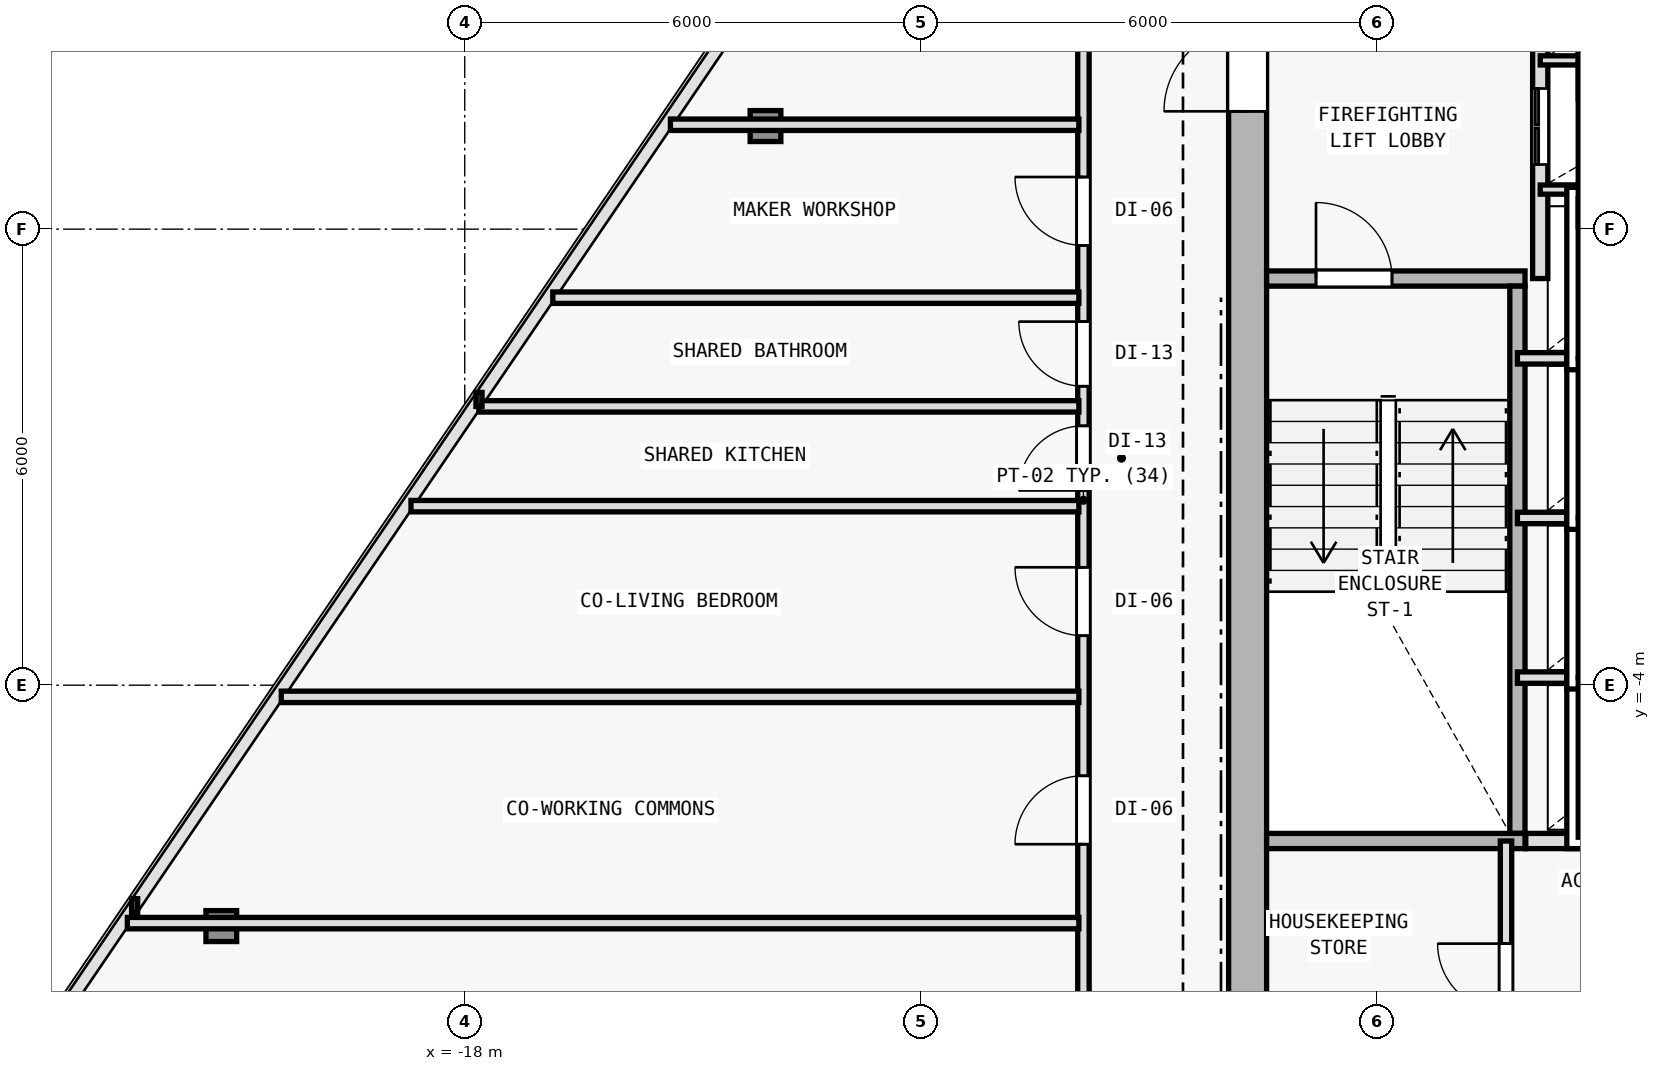
"""IFC4 building model, lengths in metres.
Left out: names, types, materials, properties, quantities, classifications, styles, units other than length and angle.
Written with IfcOpenShell. Run it as: python <this file> out.ifc"""

import sys

from ifc_helpers import new_model, si_unit, direction, frame, frame_2d, origin, origin_2d, place, context, subcontext, project, spatial, rectangle, i_section, extrude, element, fill, save


model = new_model("IFC4")
c1 = context("Model", 3, precision=1e-05, world=origin(), true_north=direction((0.0, 1.0)))
c2 = subcontext(c1, "Body", "Model", "MODEL_VIEW")
j1 = project(units=[si_unit("LENGTHUNIT", "METRE"), si_unit("PLANEANGLEUNIT", "RADIAN")], contexts=[c1])
p1 = place(None, origin())
s1 = spatial("IfcSite", under=j1, at=p1, CompositionType="ELEMENT")
p2 = place(p1, origin())
s2 = spatial("IfcBuilding", under=s1, at=p2, CompositionType="ELEMENT")
p3 = place(p2, frame((0.0, 0.0, 156.6)))
s3 = spatial("IfcBuildingStorey", under=s2, at=p3, CompositionType="ELEMENT", Elevation=156.6)
p4 = place(p3, frame((-7.7, 2.0, 0.0), z_axis=(0.0, 0.0, 1.0), x_axis=(1.0, 0.0, 0.0)))
e1 = element("IfcColumn", 1, at=p4, inside=s3, PredefinedType="COLUMN", context=c2, shape_type="SweptSolid", body=[
    extrude(i_section(OverallWidth=0.404, OverallDepth=0.407, WebThickness=0.017, FlangeThickness=0.028, FilletRadius=0.015, at=origin_2d()), origin(), (0.0, 0.0, 1.0), 3.6),
])
p5 = place(p3, frame((-14.043, 3.356, 0.005), z_axis=(0.01700241672, 0.009521353363, 0.999810112799), x_axis=(-0.488603368932, 0.87250601595, 0.0)))
e2 = element("IfcColumn", 2, at=p5, inside=s3, PredefinedType="COLUMN", context=c2, shape_type="SweptSolid", body=[
    extrude(i_section(OverallWidth=0.404, OverallDepth=0.407, WebThickness=0.017, FlangeThickness=0.028, FilletRadius=0.015, at=origin_2d()), origin(), (0.0, 0.0, 1.0), 3.59),
])
p6 = place(p3, frame((-21.203, -7.169, 0.005), z_axis=(0.025222449659, 0.021619242565, 0.999448065876), x_axis=(-0.650791373456, 0.759256602365, 0.0)))
e3 = element("IfcColumn", 3, at=p6, inside=s3, PredefinedType="COLUMN", context=c2, shape_type="SweptSolid", body=[
    extrude(i_section(OverallWidth=0.404, OverallDepth=0.407, WebThickness=0.017, FlangeThickness=0.028, FilletRadius=0.015, at=origin_2d()), origin(), (0.0, 0.0, 1.0), 3.591),
])
p7 = place(p3, frame((-7.7, -9.15, 0.0), z_axis=(0.0, 0.0, 1.0), x_axis=(0.0, 1.0, 0.0)))
e4 = element("IfcWall", 4, at=p7, inside=s3, PredefinedType="SHEAR", context=c2, shape_type="SweptSolid", body=[
    extrude(rectangle(XDim=19.1, YDim=0.5, at=frame_2d((9.55, 0.0))), origin(), (0.0, 0.0, 1.0), 3.35),
])
p8 = place(p7, frame((12.7, 0.0, 0.0)))
e5 = element("IfcOpeningElement", 5, at=p8, cuts=e4, PredefinedType="OPENING", context=c2, shape_type="SweptSolid", body=[
    extrude(rectangle(XDim=1.1, YDim=2.15, at=frame_2d((0.55, 1.075))), frame((0.0, 0.26, 0.0), z_axis=(0.0, -1.0, 0.0), x_axis=(1.0, 0.0, 0.0)), (0.0, 0.0, 1.0), 0.52),
])
p9 = place(p3, frame((-7.45, 1.35, 0.0), z_axis=(0.0, 0.0, 1.0), x_axis=(1.0, 0.0, 0.0)))
e6 = element("IfcWall", 6, at=p9, inside=s3, PredefinedType="SOLIDWALL", context=c2, shape_type="SweptSolid", body=[
    extrude(rectangle(XDim=3.4, YDim=0.2, at=frame_2d((1.7, 0.0))), origin(), (0.0, 0.0, 1.0), 3.35),
])
p10 = place(p9, frame((0.65, 0.0, 0.0)))
e7 = element("IfcOpeningElement", 7, at=p10, cuts=e6, PredefinedType="OPENING", context=c2, shape_type="SweptSolid", body=[
    extrude(rectangle(XDim=1.0, YDim=2.15, at=frame_2d((0.5, 1.075))), frame((0.0, 0.11, 0.0), z_axis=(0.0, -1.0, 0.0), x_axis=(1.0, 0.0, 0.0)), (0.0, 0.0, 1.0), 0.22),
])
p11 = place(p3, frame((-4.15, -5.95, 0.0), z_axis=(0.0, 0.0, 1.0), x_axis=(0.0, 1.0, 0.0)))
e8 = element("IfcWall", 8, at=p11, inside=s3, PredefinedType="SOLIDWALL", context=c2, shape_type="SweptSolid", body=[
    extrude(rectangle(XDim=7.2, YDim=0.2, at=frame_2d((3.6, 0.0))), origin(), (0.0, 0.0, 1.0), 3.35),
])
p12 = place(p3, frame((-3.85, 1.35, 0.0), z_axis=(0.0, 0.0, 1.0), x_axis=(0.0, 1.0, 0.0)))
e9 = element("IfcWall", 9, at=p12, inside=s3, PredefinedType="SOLIDWALL", context=c2, shape_type="SweptSolid", body=[
    extrude(rectangle(XDim=8.595, YDim=0.2, at=frame_2d((4.297, 0.0))), origin(), (0.0, 0.0, 1.0), 3.35),
])
p13 = place(p12, frame((1.5, 0.0, 0.0)))
e10 = element("IfcOpeningElement", 10, at=p13, cuts=e9, PredefinedType="OPENING", context=c2, shape_type="SweptSolid", body=[
    extrude(rectangle(XDim=1.0, YDim=2.15, at=frame_2d((0.5, 1.075))), frame((0.0, 0.11, 0.0), z_axis=(0.0, -1.0, 0.0), x_axis=(1.0, 0.0, 0.0)), (0.0, 0.0, 1.0), 0.22),
])
p14 = place(p12, frame((3.18, 0.0, 0.0)))
e11 = element("IfcOpeningElement", 11, at=p14, cuts=e9, PredefinedType="OPENING", context=c2, shape_type="SweptSolid", body=[
    extrude(rectangle(XDim=1.0, YDim=2.15, at=frame_2d((0.5, 1.075))), frame((0.0, 0.11, 0.0), z_axis=(0.0, -1.0, 0.0), x_axis=(1.0, 0.0, 0.0)), (0.0, 0.0, 1.0), 0.22),
])
for number, where, z_axis, x_axis in (
    (12, (-3.85, 2.52, 0.0), (0.0, 0.0, 1.0), (1.0, 0.0, 0.0)),
    (13, (-3.85, 4.22, 0.0), (0.0, 0.0, 1.0), (1.0, 0.0, 0.0)),
):
    element("IfcWall", number, at=place(p3, frame(where, z_axis=z_axis, x_axis=x_axis)), inside=s3, PredefinedType="PARTITIONING", context=c2, shape_type="SweptSolid", body=[
        extrude(rectangle(XDim=2.9, YDim=0.12, at=frame_2d((1.45, 0.0))), origin(), (0.0, 0.0, 1.0), 3.35),
    ])
for number, where, z_axis, x_axis in (
    (14, (-4.15, -3.9, 0.0), (0.0, 0.0, 1.0), (1.0, 0.0, 0.0)),
    (15, (-4.15, -1.8, 0.0), (0.0, 0.0, 1.0), (1.0, 0.0, 0.0)),
    (16, (-4.15, 0.3, 0.0), (0.0, 0.0, 1.0), (1.0, 0.0, 0.0)),
):
    element("IfcWall", number, at=place(p3, frame(where, z_axis=z_axis, x_axis=x_axis)), inside=s3, PredefinedType="PARTITIONING", context=c2, shape_type="SweptSolid", body=[
        extrude(rectangle(XDim=2.9, YDim=0.15, at=frame_2d((1.45, 0.0))), origin(), (0.0, 0.0, 1.0), 3.35),
    ])
p15 = place(p3, frame((-7.45, -6.05, 0.0), z_axis=(0.0, 0.0, 1.0), x_axis=(1.0, 0.0, 0.0)))
e17 = element("IfcWall", 17, at=p15, inside=s3, PredefinedType="SOLIDWALL", context=c2, shape_type="SweptSolid", body=[
    extrude(rectangle(XDim=3.4, YDim=0.2, at=frame_2d((1.7, 0.0))), origin(), (0.0, 0.0, 1.0), 3.35),
])
p16 = place(p3, frame((-4.04, -6.05, 0.0), z_axis=(0.0, 0.0, 1.0), x_axis=(1.0, 0.0, 0.0)))
e18 = element("IfcWall", 18, at=p16, inside=s3, PredefinedType="SOLIDWALL", context=c2, shape_type="SweptSolid", body=[
    extrude(rectangle(XDim=2.79, YDim=0.2, at=frame_2d((1.395, 0.0))), origin(), (0.0, 0.0, 1.0), 3.35),
])
p17 = place(p3, frame((-4.3, -9.145, 0.0), z_axis=(0.0, 0.0, 1.0), x_axis=(0.0, 1.0, 0.0)))
e19 = element("IfcWall", 19, at=p17, inside=s3, PredefinedType="PARTITIONING", context=c2, shape_type="SweptSolid", body=[
    extrude(rectangle(XDim=3.095, YDim=0.15, at=frame_2d((1.547, 0.0))), origin(), (0.0, 0.0, 1.0), 3.35),
])
p18 = place(p17, frame((0.845, 0.0, 0.0)))
e20 = element("IfcOpeningElement", 20, at=p18, cuts=e19, PredefinedType="OPENING", context=c2, shape_type="SweptSolid", body=[
    extrude(rectangle(XDim=0.9, YDim=2.1, at=frame_2d((0.45, 1.05))), frame((0.0, 0.085, 0.0), z_axis=(0.0, -1.0, 0.0), x_axis=(1.0, 0.0, 0.0)), (0.0, 0.0, 1.0), 0.17),
])
p19 = place(p3, frame((-9.86, -11.56, 0.0), z_axis=(0.0, 0.0, 1.0), x_axis=(0.0, 1.0, 0.0)))
e21 = element("IfcWall", 21, at=p19, inside=s3, PredefinedType="PARTITIONING", context=c2, shape_type="SweptSolid", body=[
    extrude(rectangle(XDim=19.986, YDim=0.15, at=frame_2d((9.993, 0.0))), origin(), (0.0, 0.0, 1.0), 2.775),
])
p20 = place(p19, frame((11.493, 0.0, 0.0)))
e22 = element("IfcOpeningElement", 22, at=p20, cuts=e21, PredefinedType="OPENING", context=c2, shape_type="SweptSolid", body=[
    extrude(rectangle(XDim=0.85, YDim=2.1, at=frame_2d((0.425, 1.05))), frame((0.0, 0.085, 0.0), z_axis=(0.0, -1.0, 0.0), x_axis=(1.0, 0.0, 0.0)), (0.0, 0.0, 1.0), 0.17),
])
p21 = place(p19, frame((10.122, 0.0, 0.0)))
e23 = element("IfcOpeningElement", 23, at=p21, cuts=e21, PredefinedType="OPENING", context=c2, shape_type="SweptSolid", body=[
    extrude(rectangle(XDim=0.85, YDim=2.1, at=frame_2d((0.425, 1.05))), frame((0.0, 0.085, 0.0), z_axis=(0.0, -1.0, 0.0), x_axis=(1.0, 0.0, 0.0)), (0.0, 0.0, 1.0), 0.17),
])
p22 = place(p19, frame((8.211, 0.0, 0.0)))
e24 = element("IfcOpeningElement", 24, at=p22, cuts=e21, PredefinedType="OPENING", context=c2, shape_type="SweptSolid", body=[
    extrude(rectangle(XDim=0.9, YDim=2.1, at=frame_2d((0.45, 1.05))), frame((0.0, 0.085, 0.0), z_axis=(0.0, -1.0, 0.0), x_axis=(1.0, 0.0, 0.0)), (0.0, 0.0, 1.0), 0.17),
])
p23 = place(p19, frame((5.468, 0.0, 0.0)))
e25 = element("IfcOpeningElement", 25, at=p23, cuts=e21, PredefinedType="OPENING", context=c2, shape_type="SweptSolid", body=[
    extrude(rectangle(XDim=0.9, YDim=2.1, at=frame_2d((0.45, 1.05))), frame((0.0, 0.085, 0.0), z_axis=(0.0, -1.0, 0.0), x_axis=(1.0, 0.0, 0.0)), (0.0, 0.0, 1.0), 0.17),
])
p24 = place(p19, frame((1.854, 0.0, 0.0)))
e26 = element("IfcOpeningElement", 26, at=p24, cuts=e21, PredefinedType="OPENING", context=c2, shape_type="SweptSolid", body=[
    extrude(rectangle(XDim=0.9, YDim=2.1, at=frame_2d((0.45, 1.05))), frame((0.0, 0.085, 0.0), z_axis=(0.0, -1.0, 0.0), x_axis=(1.0, 0.0, 0.0)), (0.0, 0.0, 1.0), 0.17),
])
p25 = place(p19, frame((13.346, 0.0, 0.0)))
e27 = element("IfcOpeningElement", 27, at=p25, cuts=e21, PredefinedType="OPENING", context=c2, shape_type="SweptSolid", body=[
    extrude(rectangle(XDim=0.9, YDim=2.1, at=frame_2d((0.45, 1.05))), frame((0.0, 0.085, 0.0), z_axis=(0.0, -1.0, 0.0), x_axis=(1.0, 0.0, 0.0)), (0.0, 0.0, 1.0), 0.17),
])
p26 = place(p3, frame((-9.92, 3.373, 0.0), z_axis=(0.0, 0.0, 1.0), x_axis=(-1.0, 0.0, 0.0)))
e28 = element("IfcWall", 28, at=p26, inside=s3, PredefinedType="PARTITIONING", context=c2, shape_type="SweptSolid", body=[
    extrude(rectangle(XDim=5.374, YDim=0.15, at=frame_2d((2.687, 0.0))), origin(), (0.0, 0.0, 1.0), 2.885),
])
p27 = place(p3, frame((-9.92, -7.13, 0.0), z_axis=(0.0, 0.0, 1.0), x_axis=(-1.0, 0.0, 0.0)))
e29 = element("IfcWall", 29, at=p27, inside=s3, PredefinedType="PARTITIONING", context=c2, shape_type="SweptSolid", body=[
    extrude(rectangle(XDim=12.519, YDim=0.15, at=frame_2d((6.26, 0.0))), origin(), (0.0, 0.0, 1.0), 2.775),
])
p28 = place(p3, frame((-9.92, -1.645, 0.0), z_axis=(0.0, 0.0, 1.0), x_axis=(-1.0, 0.0, 0.0)))
e30 = element("IfcWall", 30, at=p28, inside=s3, PredefinedType="PARTITIONING", context=c2, shape_type="SweptSolid", body=[
    extrude(rectangle(XDim=8.788, YDim=0.15, at=frame_2d((4.394, 0.0))), origin(), (0.0, 0.0, 1.0), 2.885),
])
p29 = place(p3, frame((-9.92, -4.154, 0.0), z_axis=(0.0, 0.0, 1.0), x_axis=(-0.999999999729, 2.3263929e-05, 0.0)))
e31 = element("IfcWall", 31, at=p29, inside=s3, PredefinedType="PARTITIONING", context=c2, shape_type="SweptSolid", body=[
    extrude(rectangle(XDim=10.494, YDim=0.15, at=frame_2d((5.247, 0.0))), origin(), (0.0, 0.0, 1.0), 2.885),
])
p30 = place(p3, frame((-9.92, 1.098, 0.0), z_axis=(0.0, 0.0, 1.0), x_axis=(-0.999999999378, 3.5272124e-05, 0.0)))
e32 = element("IfcWall", 32, at=p30, inside=s3, PredefinedType="PARTITIONING", context=c2, shape_type="SweptSolid", body=[
    extrude(rectangle(XDim=6.922, YDim=0.15, at=frame_2d((3.461, 0.0))), origin(), (0.0, 0.0, 1.0), 2.885),
])
p31 = place(p3, frame((-9.92, -0.332, 0.0), z_axis=(0.0, 0.0, 1.0), x_axis=(-1.0, 0.0, 0.0)))
e33 = element("IfcWall", 33, at=p31, inside=s3, PredefinedType="PARTITIONING", context=c2, shape_type="SweptSolid", body=[
    extrude(rectangle(XDim=7.894, YDim=0.15, at=frame_2d((3.947, 0.0))), origin(), (0.0, 0.0, 1.0), 2.885),
])
p32 = place(p8, origin())
e34 = element("IfcDoor", 34, at=p32, inside=s3, OperationType="SINGLE_SWING_LEFT", PredefinedType="DOOR", context=c2, shape_type="SweptSolid", body=[
    extrude(rectangle(XDim=1.1, YDim=2.15, at=frame_2d((0.55, 1.075))), frame((0.0, 0.025, 0.0), z_axis=(0.0, -1.0, 0.0), x_axis=(1.0, 0.0, 0.0)), (0.0, 0.0, 1.0), 0.05),
])
fill(e5, e34)
p33 = place(p10, origin())
e35 = element("IfcDoor", 35, at=p33, inside=s3, OperationType="SINGLE_SWING_LEFT", PredefinedType="DOOR", context=c2, shape_type="SweptSolid", body=[
    extrude(rectangle(XDim=1.0, YDim=2.15, at=frame_2d((0.5, 1.075))), frame((0.0, 0.025, 0.0), z_axis=(0.0, -1.0, 0.0), x_axis=(1.0, 0.0, 0.0)), (0.0, 0.0, 1.0), 0.05),
])
fill(e7, e35)
p34 = place(p13, origin())
e36 = element("IfcDoor", 36, at=p34, inside=s3, OperationType="DOUBLE_DOOR_SLIDING", PredefinedType="DOOR", context=c2, shape_type="SweptSolid", body=[
    extrude(rectangle(XDim=1.0, YDim=2.15, at=frame_2d((0.5, 1.075))), frame((0.0, 0.025, 0.0), z_axis=(0.0, -1.0, 0.0), x_axis=(1.0, 0.0, 0.0)), (0.0, 0.0, 1.0), 0.05),
])
fill(e10, e36)
p35 = place(p18, origin())
e37 = element("IfcDoor", 37, at=p35, inside=s3, OperationType="SINGLE_SWING_RIGHT", PredefinedType="DOOR", context=c2, shape_type="SweptSolid", body=[
    extrude(rectangle(XDim=0.9, YDim=2.1, at=frame_2d((0.45, 1.05))), frame((0.0, 0.025, 0.0), z_axis=(0.0, -1.0, 0.0), x_axis=(1.0, 0.0, 0.0)), (0.0, 0.0, 1.0), 0.05),
])
fill(e20, e37)
p36 = place(p20, origin())
e38 = element("IfcDoor", 38, at=p36, inside=s3, OperationType="SINGLE_SWING_RIGHT", PredefinedType="DOOR", context=c2, shape_type="SweptSolid", body=[
    extrude(rectangle(XDim=0.85, YDim=2.1, at=frame_2d((0.425, 1.05))), frame((0.0, 0.025, 0.0), z_axis=(0.0, -1.0, 0.0), x_axis=(1.0, 0.0, 0.0)), (0.0, 0.0, 1.0), 0.05),
])
fill(e22, e38)
p37 = place(p21, origin())
e39 = element("IfcDoor", 39, at=p37, inside=s3, OperationType="SINGLE_SWING_LEFT", PredefinedType="DOOR", context=c2, shape_type="SweptSolid", body=[
    extrude(rectangle(XDim=0.85, YDim=2.1, at=frame_2d((0.425, 1.05))), frame((0.0, 0.025, 0.0), z_axis=(0.0, -1.0, 0.0), x_axis=(1.0, 0.0, 0.0)), (0.0, 0.0, 1.0), 0.05),
])
fill(e23, e39)
p38 = place(p22, origin())
e40 = element("IfcDoor", 40, at=p38, inside=s3, OperationType="SINGLE_SWING_RIGHT", PredefinedType="DOOR", context=c2, shape_type="SweptSolid", body=[
    extrude(rectangle(XDim=0.9, YDim=2.1, at=frame_2d((0.45, 1.05))), frame((0.0, 0.025, 0.0), z_axis=(0.0, -1.0, 0.0), x_axis=(1.0, 0.0, 0.0)), (0.0, 0.0, 1.0), 0.05),
])
fill(e24, e40)
p39 = place(p23, origin())
e41 = element("IfcDoor", 41, at=p39, inside=s3, OperationType="SINGLE_SWING_LEFT", PredefinedType="DOOR", context=c2, shape_type="SweptSolid", body=[
    extrude(rectangle(XDim=0.9, YDim=2.1, at=frame_2d((0.45, 1.05))), frame((0.0, 0.025, 0.0), z_axis=(0.0, -1.0, 0.0), x_axis=(1.0, 0.0, 0.0)), (0.0, 0.0, 1.0), 0.05),
])
fill(e25, e41)
p40 = place(p25, origin())
e42 = element("IfcDoor", 42, at=p40, inside=s3, OperationType="SINGLE_SWING_RIGHT", PredefinedType="DOOR", context=c2, shape_type="SweptSolid", body=[
    extrude(rectangle(XDim=0.9, YDim=2.1, at=frame_2d((0.45, 1.05))), frame((0.0, 0.025, 0.0), z_axis=(0.0, -1.0, 0.0), x_axis=(1.0, 0.0, 0.0)), (0.0, 0.0, 1.0), 0.05),
])
fill(e27, e42)
save(model, sys.argv[1])
